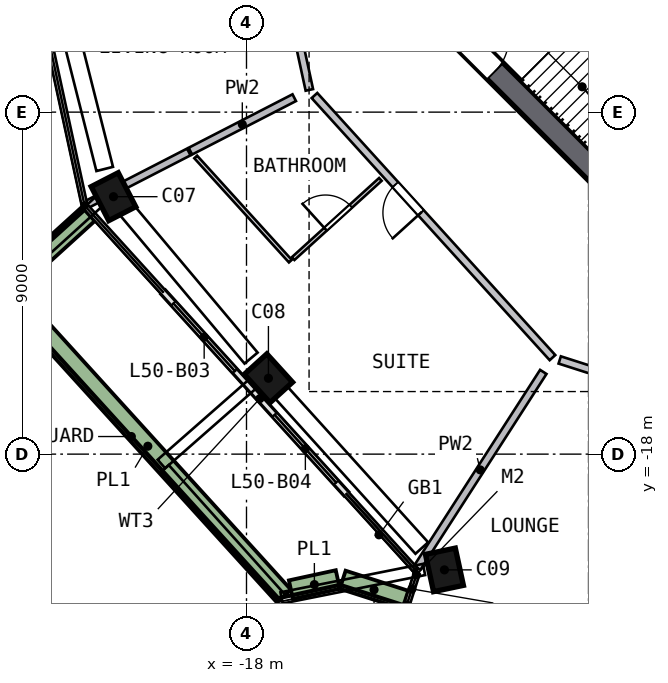
"""IFC4 building model, lengths in metres.
Left out: names, types, materials, properties, quantities, classifications, styles, units other than length and angle.
Written with IfcOpenShell. Run it as: python <this file> out.ifc"""

import sys

from ifc_helpers import new_model, si_unit, direction, frame, frame_2d, origin, origin_2d, place, context, subcontext, project, spatial, rectangle, extrude, element, fill, save


model = new_model("IFC4")
c1 = context("Model", 3, precision=1e-05, world=origin(), true_north=direction((0.0, 1.0)))
c2 = subcontext(c1, "Body", "Model", "MODEL_VIEW")
j1 = project(units=[si_unit("LENGTHUNIT", "METRE"), si_unit("PLANEANGLEUNIT", "RADIAN")], contexts=[c1])
p1 = place(None, origin())
s1 = spatial("IfcSite", under=j1, at=p1, CompositionType="ELEMENT")
p2 = place(p1, origin())
s2 = spatial("IfcBuilding", under=s1, at=p2, CompositionType="ELEMENT")
p3 = place(p2, frame((0.0, 0.0, 205.5)))
s3 = spatial("IfcBuildingStorey", under=s2, at=p3, CompositionType="ELEMENT", Elevation=205.5)
p4 = place(p3, frame((-21.565, -11.102, 0.0), z_axis=(0.053672705, -0.102099777, 0.993325161), x_axis=(-0.4547247, 0.883131513, 0.115343736)))
e1 = element("IfcColumn", 1, at=p4, inside=s3, PredefinedType="COLUMN", context=c2, shape_type="SweptSolid", body=[
    extrude(rectangle(XDim=1.0, YDim=0.8, at=origin_2d()), origin(), (0.0, 0.0, 1.0), 3.211),
])
p5 = place(p3, frame((-17.515, -15.904, 0.0), z_axis=(0.076352583, -0.082664599, 0.993648251), x_axis=(0.667977152, -0.735625089, -0.112526675)))
e2 = element("IfcColumn", 2, at=p5, inside=s3, PredefinedType="COLUMN", context=c2, shape_type="SweptSolid", body=[
    extrude(rectangle(XDim=1.0, YDim=0.8, at=origin_2d()), origin(), (0.0, 0.0, 1.0), 3.21),
])
p6 = place(p3, frame((-12.913, -20.973, 0.0), z_axis=(0.100178851, -0.060578562, 0.993123575), x_axis=(-0.204249823, 0.975634972, 0.080114981)))
e3 = element("IfcColumn", 3, at=p6, inside=s3, PredefinedType="COLUMN", context=c2, shape_type="SweptSolid", body=[
    extrude(rectangle(XDim=1.0, YDim=0.8, at=origin_2d()), origin(), (0.0, 0.0, 1.0), 3.212),
])
p7 = place(p3, frame((-13.788, -5.587, 0.0), z_axis=(0.0, 0.0, 1.0), x_axis=(0.707106781, -0.707106781, 0.0)))
e4 = element("IfcWall", 4, at=p7, inside=s3, PredefinedType="SHEAR", context=c2, shape_type="SweptSolid", body=[
    extrude(rectangle(XDim=11.598, YDim=0.6, at=frame_2d((5.799, 0.0))), origin(), (0.0, 0.0, 1.0), 3.5),
])
p8 = place(p7, frame((2.099, 0.0, 0.0)))
e5 = element("IfcOpeningElement", 5, at=p8, cuts=e4, PredefinedType="OPENING", context=c2, shape_type="SweptSolid", body=[
    extrude(rectangle(XDim=1.2, YDim=2.1, at=frame_2d((0.6, 1.05))), frame((0.0, 0.31, 0.0), z_axis=(0.0, -1.0, 0.0), x_axis=(1.0, 0.0, 0.0)), (0.0, 0.0, 1.0), 0.62),
])
p9 = place(p3, frame((-20.189, -13.74, 0.0), z_axis=(0.0, 0.0, 1.0), x_axis=(0.672250944, -0.740323354, 0.0)))
e6 = element("IfcWall", 6, at=p9, inside=s3, PredefinedType="SOLIDWALL", context=c2, shape_type="SweptSolid", body=[
    extrude(rectangle(XDim=3.4, YDim=0.15, at=frame_2d((1.7, 0.0))), origin(), (0.0, 0.0, 1.0), 2.475),
])
p10 = place(p9, frame((0.4, 0.0, 0.0)))
e7 = element("IfcOpeningElement", 7, at=p10, cuts=e6, PredefinedType="OPENING", context=c2, shape_type="SweptSolid", body=[
    extrude(rectangle(XDim=2.4, YDim=2.4, at=frame_2d((1.2, 1.2))), frame((0.0, 0.085, 0.0), z_axis=(0.0, -1.0, 0.0), x_axis=(1.0, 0.0, 0.0)), (0.0, 0.0, 1.0), 0.17),
])
p11 = place(p3, frame((-17.904, -16.257, 0.0), z_axis=(0.0, 0.0, 1.0), x_axis=(0.672243001, -0.740330566, 0.0)))
e8 = element("IfcWall", 8, at=p11, inside=s3, PredefinedType="SOLIDWALL", context=c2, shape_type="SweptSolid", body=[
    extrude(rectangle(XDim=3.761, YDim=0.15, at=frame_2d((1.881, 0.0))), origin(), (0.0, 0.0, 1.0), 2.475),
])
p12 = place(p11, frame((0.961, 0.0, 0.0)))
e9 = element("IfcOpeningElement", 9, at=p12, cuts=e8, PredefinedType="OPENING", context=c2, shape_type="SweptSolid", body=[
    extrude(rectangle(XDim=2.4, YDim=2.4, at=frame_2d((1.2, 1.2))), frame((0.0, 0.085, 0.0), z_axis=(0.0, -1.0, 0.0), x_axis=(1.0, 0.0, 0.0)), (0.0, 0.0, 1.0), 0.17),
])
p13 = place(p3, frame((-22.162, -11.681, 0.0), z_axis=(0.0, 0.0, 1.0), x_axis=(-0.74028876, -0.672289039, 0.0)))
e10 = element("IfcWall", 10, at=p13, inside=s3, PredefinedType="SOLIDWALL", context=c2, shape_type="SweptSolid", body=[
    extrude(rectangle(XDim=3.199, YDim=0.5, at=frame_2d((1.6, 0.0))), origin(), (0.0, 0.0, 1.0), 0.7),
])
p14 = place(p3, frame((-24.177, -13.848, 0.0), z_axis=(0.0, 0.0, 1.0), x_axis=(0.672241483, -0.740331945, 0.0)))
e11 = element("IfcWall", 11, at=p14, inside=s3, PredefinedType="SOLIDWALL", context=c2, shape_type="SweptSolid", body=[
    extrude(rectangle(XDim=10.653, YDim=0.5, at=frame_2d((5.326, 0.0))), origin(), (0.0, 0.0, 1.0), 0.7),
])
p15 = place(p3, frame((-16.831, -21.567, 0.0), z_axis=(0.0, 0.0, 1.0), x_axis=(0.977258362, 0.212052102, 0.0)))
e12 = element("IfcWall", 12, at=p15, inside=s3, PredefinedType="SOLIDWALL", context=c2, shape_type="SweptSolid", body=[
    extrude(rectangle(XDim=1.262, YDim=0.5, at=frame_2d((0.631, 0.0))), origin(), (0.0, 0.0, 1.0), 0.7),
])
p16 = place(p3, frame((-15.468, -21.305, 0.0), z_axis=(0.0, 0.0, 1.0), x_axis=(0.952327477, -0.305077656, 0.0)))
e13 = element("IfcWall", 13, at=p16, inside=s3, PredefinedType="SOLIDWALL", context=c2, shape_type="SweptSolid", body=[
    extrude(rectangle(XDim=1.731, YDim=0.5, at=frame_2d((0.865, 0.0))), origin(), (0.0, 0.0, 1.0), 0.7),
])
p17 = place(p3, frame((-3.535, -9.334, 0.0), z_axis=(0.0, 0.0, 1.0), x_axis=(-0.707120946, 0.707092617, 0.0)))
e14 = element("IfcWall", 14, at=p17, inside=s3, PredefinedType="SOLIDWALL", context=c2, shape_type="SweptSolid", body=[
    extrude(rectangle(XDim=8.618, YDim=0.2, at=frame_2d((4.309, 0.0))), origin(), (0.0, 0.0, 1.0), 3.19),
])
p18 = place(p17, frame((6.6, 0.0, 0.0)))
e15 = element("IfcOpeningElement", 15, at=p18, cuts=e14, PredefinedType="OPENING", context=c2, shape_type="SweptSolid", body=[
    extrude(rectangle(XDim=1.2, YDim=2.1, at=frame_2d((0.6, 1.05))), frame((0.0, 0.11, 0.0), z_axis=(0.0, -1.0, 0.0), x_axis=(1.0, 0.0, 0.0)), (0.0, 0.0, 1.0), 0.22),
])
p19 = place(p3, frame((-16.346, -8.415, 0.0), z_axis=(0.0, 0.0, 1.0), x_axis=(-0.211999887, 0.97726969, 0.0)))
e16 = element("IfcWall", 16, at=p19, inside=s3, PredefinedType="SOLIDWALL", context=c2, shape_type="SweptSolid", body=[
    extrude(rectangle(XDim=9.316, YDim=0.2, at=frame_2d((4.658, 0.0))), origin(), (0.0, 0.0, 1.0), 3.19),
])
p20 = place(p19, frame((1.9, 0.0, 0.0)))
e17 = element("IfcOpeningElement", 17, at=p20, cuts=e16, PredefinedType="OPENING", context=c2, shape_type="SweptSolid", body=[
    extrude(rectangle(XDim=1.0, YDim=2.1, at=frame_2d((0.5, 1.05))), frame((0.0, 0.11, 0.0), z_axis=(0.0, -1.0, 0.0), x_axis=(1.0, 0.0, 0.0)), (0.0, 0.0, 1.0), 0.22),
])
p21 = place(p3, frame((-9.948, -15.46, 0.0), z_axis=(0.0, 0.0, 1.0), x_axis=(-0.672246163, 0.740327695, 0.0)))
e18 = element("IfcWall", 18, at=p21, inside=s3, PredefinedType="SOLIDWALL", context=c2, shape_type="SweptSolid", body=[
    extrude(rectangle(XDim=9.316, YDim=0.2, at=frame_2d((4.658, 0.0))), origin(), (0.0, 0.0, 1.0), 3.19),
])
p22 = place(p21, frame((5.15, 0.0, 0.0)))
e19 = element("IfcOpeningElement", 19, at=p22, cuts=e18, PredefinedType="OPENING", context=c2, shape_type="SweptSolid", body=[
    extrude(rectangle(XDim=1.0, YDim=2.1, at=frame_2d((0.5, 1.05))), frame((0.0, 0.11, 0.0), z_axis=(0.0, -1.0, 0.0), x_axis=(1.0, 0.0, 0.0)), (0.0, 0.0, 1.0), 0.22),
])
p23 = place(p3, frame((-0.885, -18.363, 0.0), z_axis=(0.0, 0.0, 1.0), x_axis=(-0.952343787, 0.305026737, 0.0)))
e20 = element("IfcWall", 20, at=p23, inside=s3, PredefinedType="SOLIDWALL", context=c2, shape_type="SweptSolid", body=[
    extrude(rectangle(XDim=9.317, YDim=0.2, at=frame_2d((4.658, 0.0))), origin(), (0.0, 0.0, 1.0), 3.19),
])
p24 = place(p23, frame((3.869, 0.0, 0.0)))
e21 = element("IfcOpeningElement", 21, at=p24, cuts=e20, PredefinedType="OPENING", context=c2, shape_type="SweptSolid", body=[
    extrude(rectangle(XDim=1.8, YDim=2.1, at=frame_2d((0.9, 1.05))), frame((0.0, 0.11, 0.0), z_axis=(0.0, -1.0, 0.0), x_axis=(1.0, 0.0, 0.0)), (0.0, 0.0, 1.0), 0.22),
])
p25 = place(p3, frame((-19.518, -10.048, 0.0), z_axis=(0.0, 0.0, 1.0), x_axis=(-0.889095542, -0.457721659, 0.0)))
e22 = element("IfcWall", 22, at=p25, inside=s3, PredefinedType="SOLIDWALL", context=c2, shape_type="SweptSolid", body=[
    extrude(rectangle(XDim=3.011, YDim=0.2, at=frame_2d((1.506, 0.0))), origin(), (0.0, 0.0, 1.0), 3.19),
])
p26 = place(p3, frame((-16.743, -8.62, 0.0), z_axis=(0.0, 0.0, 1.0), x_axis=(-0.889125357, -0.45766374, 0.0)))
e23 = element("IfcWall", 23, at=p26, inside=s3, PredefinedType="SOLIDWALL", context=c2, shape_type="SweptSolid", body=[
    extrude(rectangle(XDim=3.075, YDim=0.2, at=frame_2d((1.537, 0.0))), origin(), (0.0, 0.0, 1.0), 3.19),
])
p27 = place(p3, frame((-13.509, -20.993, 0.0), z_axis=(0.0, 0.0, 1.0), x_axis=(0.541111701, 0.840950728, 0.0)))
e24 = element("IfcWall", 24, at=p27, inside=s3, PredefinedType="SOLIDWALL", context=c2, shape_type="SweptSolid", body=[
    extrude(rectangle(XDim=6.132, YDim=0.2, at=frame_2d((3.066, 0.0))), origin(), (0.0, 0.0, 1.0), 3.19),
])
p28 = place(p3, frame((-10.353, -26.829, 0.0), z_axis=(0.0, 0.0, 1.0), x_axis=(0.305045998, 0.952337618, 0.0)))
e25 = element("IfcWall", 25, at=p28, inside=s3, PredefinedType="SOLIDWALL", context=c2, shape_type="SweptSolid", body=[
    extrude(rectangle(XDim=10.75, YDim=0.2, at=frame_2d((5.375, 0.0))), origin(), (0.0, 0.0, 1.0), 3.19),
])
p29 = place(p28, frame((1.95, 0.0, 0.0)))
e26 = element("IfcOpeningElement", 26, at=p29, cuts=e25, PredefinedType="OPENING", context=c2, shape_type="SweptSolid", body=[
    extrude(rectangle(XDim=1.0, YDim=2.1, at=frame_2d((0.5, 1.05))), frame((0.0, 0.11, 0.0), z_axis=(0.0, -1.0, 0.0), x_axis=(1.0, 0.0, 0.0)), (0.0, 0.0, 1.0), 0.22),
])
p30 = place(p3, frame((-16.846, -12.922, 0.0), z_axis=(0.0, 0.0, 1.0), x_axis=(-0.672242906, 0.740330652, 0.0)))
e27 = element("IfcWall", 27, at=p30, inside=s3, PredefinedType="PARTITIONING", context=c2, shape_type="SweptSolid", body=[
    extrude(rectangle(XDim=3.704, YDim=0.1, at=frame_2d((1.852, 0.0))), origin(), (0.0, 0.0, 1.0), 3.19),
])
p31 = place(p3, frame((-16.772, -12.854, 0.0), z_axis=(0.0, 0.0, 1.0), x_axis=(0.74031058, 0.672265011, 0.0)))
e28 = element("IfcWall", 28, at=p31, inside=s3, PredefinedType="PARTITIONING", context=c2, shape_type="SweptSolid", body=[
    extrude(rectangle(XDim=3.1, YDim=0.1, at=frame_2d((1.55, 0.0))), origin(), (0.0, 0.0, 1.0), 3.19),
])
p32 = place(p31, frame((1.15, 0.0, 0.0)))
e29 = element("IfcOpeningElement", 29, at=p32, cuts=e28, PredefinedType="OPENING", context=c2, shape_type="SweptSolid", body=[
    extrude(rectangle(XDim=0.9, YDim=2.1, at=frame_2d((0.45, 1.05))), frame((0.0, 0.06, 0.0), z_axis=(0.0, -1.0, 0.0), x_axis=(1.0, 0.0, 0.0)), (0.0, 0.0, 1.0), 0.12),
])
p33 = place(p10, origin())
e30 = element("IfcDoor", 30, at=p33, inside=s3, OperationType="SLIDING_TO_RIGHT", PredefinedType="DOOR", context=c2, shape_type="SweptSolid", body=[
    extrude(rectangle(XDim=2.4, YDim=2.4, at=frame_2d((1.2, 1.2))), frame((0.0, 0.025, 0.0), z_axis=(0.0, -1.0, 0.0), x_axis=(1.0, 0.0, 0.0)), (0.0, 0.0, 1.0), 0.05),
])
fill(e7, e30)
p34 = place(p12, origin())
e31 = element("IfcDoor", 31, at=p34, inside=s3, OperationType="SLIDING_TO_LEFT", PredefinedType="DOOR", context=c2, shape_type="SweptSolid", body=[
    extrude(rectangle(XDim=2.4, YDim=2.4, at=frame_2d((1.2, 1.2))), frame((0.0, 0.025, 0.0), z_axis=(0.0, -1.0, 0.0), x_axis=(1.0, 0.0, 0.0)), (0.0, 0.0, 1.0), 0.05),
])
fill(e9, e31)
p35 = place(p8, origin())
e32 = element("IfcDoor", 32, at=p35, inside=s3, OperationType="SINGLE_SWING_LEFT", PredefinedType="DOOR", context=c2, shape_type="SweptSolid", body=[
    extrude(rectangle(XDim=1.2, YDim=2.1, at=frame_2d((0.6, 1.05))), frame((0.0, 0.025, 0.0), z_axis=(0.0, -1.0, 0.0), x_axis=(1.0, 0.0, 0.0)), (0.0, 0.0, 1.0), 0.05),
])
fill(e5, e32)
p36 = place(p22, origin())
e33 = element("IfcDoor", 33, at=p36, inside=s3, OperationType="SINGLE_SWING_LEFT", PredefinedType="DOOR", context=c2, shape_type="SweptSolid", body=[
    extrude(rectangle(XDim=1.0, YDim=2.1, at=frame_2d((0.5, 1.05))), frame((0.0, 0.025, 0.0), z_axis=(0.0, -1.0, 0.0), x_axis=(1.0, 0.0, 0.0)), (0.0, 0.0, 1.0), 0.05),
])
fill(e19, e33)
p37 = place(p32, origin())
e34 = element("IfcDoor", 34, at=p37, inside=s3, OperationType="SINGLE_SWING_LEFT", PredefinedType="DOOR", context=c2, shape_type="SweptSolid", body=[
    extrude(rectangle(XDim=0.9, YDim=2.1, at=frame_2d((0.45, 1.05))), frame((0.0, 0.025, 0.0), z_axis=(0.0, -1.0, 0.0), x_axis=(1.0, 0.0, 0.0)), (0.0, 0.0, 1.0), 0.05),
])
fill(e29, e34)
save(model, sys.argv[1])
